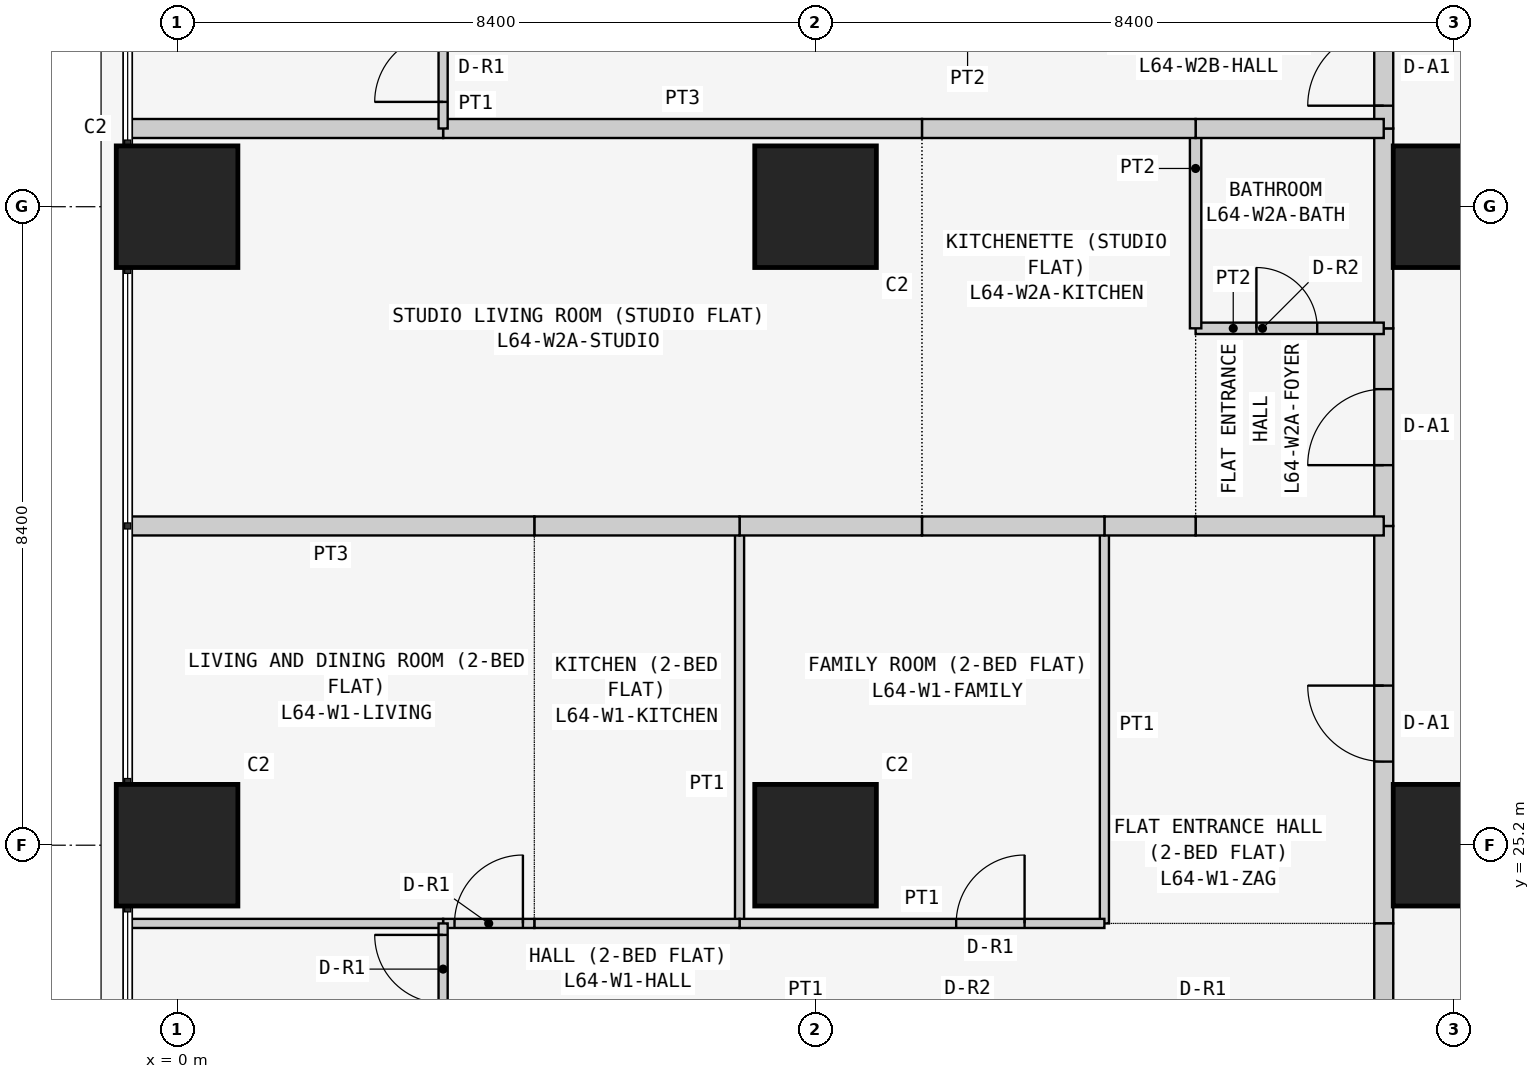
"""IFC4 building model, lengths in metres.
Left out: names, types, materials, properties, quantities, classifications, styles, units other than length and angle.
Written with IfcOpenShell. Run it as: python <this file> out.ifc"""

import sys

from ifc_helpers import new_model, si_unit, direction, frame, frame_2d, origin, origin_2d, place, context, subcontext, project, spatial, rectangle, extrude, element, fill, save


model = new_model("IFC4")
c1 = context("Model", 3, precision=1e-05, world=origin(), true_north=direction((0.0, 1.0)))
c2 = subcontext(c1, "Body", "Model", "MODEL_VIEW")
j1 = project(units=[si_unit("LENGTHUNIT", "METRE"), si_unit("PLANEANGLEUNIT", "RADIAN")], contexts=[c1])
p1 = place(None, origin())
s1 = spatial("IfcSite", under=j1, at=p1, CompositionType="ELEMENT")
p2 = place(p1, origin())
s2 = spatial("IfcBuilding", under=s1, at=p2, CompositionType="ELEMENT")
p3 = place(p2, frame((0.0, 0.0, 244.5)))
s3 = spatial("IfcBuildingStorey", under=s2, at=p3, CompositionType="ELEMENT", Elevation=244.5)
for number, where, z_axis, x_axis in (
    (1, (0.0, 25.2, 0.0), (0.0, 0.0, 1.0), (1.0, 0.0, 0.0)),
    (2, (0.0, 33.6, 0.0), (0.0, 0.0, 1.0), (1.0, 0.0, 0.0)),
    (3, (8.4, 25.2, 0.0), (0.0, 0.0, 1.0), (1.0, 0.0, 0.0)),
    (4, (8.4, 33.6, 0.0), (0.0, 0.0, 1.0), (1.0, 0.0, 0.0)),
    (5, (16.8, 25.2, 0.0), (0.0, 0.0, 1.0), (1.0, 0.0, 0.0)),
    (6, (16.8, 33.6, 0.0), (0.0, 0.0, 1.0), (1.0, 0.0, 0.0)),
):
    element("IfcColumn", number, at=place(p3, frame(where, z_axis=z_axis, x_axis=x_axis)), inside=s3, PredefinedType="COLUMN", context=c2, shape_type="SweptSolid", body=[
        extrude(rectangle(XDim=1.6, YDim=1.6, at=origin_2d()), origin(), (0.0, 0.0, 1.0), 3.6),
    ])
p4 = place(p3, frame((15.875, 24.171, 0.0), z_axis=(0.0, 0.0, 1.0), x_axis=(0.0, 1.0, 0.0)))
e7 = element("IfcWall", 7, at=p4, inside=s3, PredefinedType="PARTITIONING", context=c2, shape_type="SweptSolid", body=[
    extrude(rectangle(XDim=5.229, YDim=0.25, at=frame_2d((2.615, 0.0))), origin(), (0.0, 0.0, 1.0), 3.35),
])
p5 = place(p4, frame((2.129, 0.0, 0.0)))
e8 = element("IfcOpeningElement", 8, at=p5, cuts=e7, PredefinedType="OPENING", context=c2, shape_type="SweptSolid", body=[
    extrude(rectangle(XDim=1.0, YDim=2.1, at=frame_2d((0.5, 1.05))), frame((0.0, 0.135, 0.0), z_axis=(0.0, -1.0, 0.0), x_axis=(1.0, 0.0, 0.0)), (0.0, 0.0, 1.0), 0.27),
])
p6 = place(p3, frame((15.875, 22.971, 0.0), z_axis=(0.0, 0.0, 1.0), x_axis=(0.0, 1.0, 0.0)))
e9 = element("IfcWall", 9, at=p6, inside=s3, PredefinedType="PARTITIONING", context=c2, shape_type="SweptSolid", body=[
    extrude(rectangle(XDim=1.2, YDim=0.25, at=frame_2d((0.6, 0.0))), origin(), (0.0, 0.0, 1.0), 3.35),
])
p7 = place(p3, frame((15.875, 29.4, 0.0), z_axis=(0.0, 0.0, 1.0), x_axis=(0.0, 1.0, 0.0)))
e10 = element("IfcWall", 10, at=p7, inside=s3, PredefinedType="PARTITIONING", context=c2, shape_type="SweptSolid", body=[
    extrude(rectangle(XDim=2.6, YDim=0.25, at=frame_2d((1.3, 0.0))), origin(), (0.0, 0.0, 1.0), 3.35),
])
p8 = place(p7, frame((0.8, 0.0, 0.0)))
e11 = element("IfcOpeningElement", 11, at=p8, cuts=e10, PredefinedType="OPENING", context=c2, shape_type="SweptSolid", body=[
    extrude(rectangle(XDim=1.0, YDim=2.1, at=frame_2d((0.5, 1.05))), frame((0.0, 0.135, 0.0), z_axis=(0.0, -1.0, 0.0), x_axis=(1.0, 0.0, 0.0)), (0.0, 0.0, 1.0), 0.27),
])
p9 = place(p3, frame((15.875, 32.0, 0.0), z_axis=(0.0, 0.0, 1.0), x_axis=(0.0, 1.0, 0.0)))
e12 = element("IfcWall", 12, at=p9, inside=s3, PredefinedType="PARTITIONING", context=c2, shape_type="SweptSolid", body=[
    extrude(rectangle(XDim=2.629, YDim=0.25, at=frame_2d((1.314, 0.0))), origin(), (0.0, 0.0, 1.0), 3.35),
])
p10 = place(p3, frame((15.875, 34.629, 0.0), z_axis=(0.0, 0.0, 1.0), x_axis=(0.0, 1.0, 0.0)))
e13 = element("IfcWall", 13, at=p10, inside=s3, PredefinedType="PARTITIONING", context=c2, shape_type="SweptSolid", body=[
    extrude(rectangle(XDim=1.6, YDim=0.25, at=frame_2d((0.8, 0.0))), origin(), (0.0, 0.0, 1.0), 3.35),
])
p11 = place(p10, frame((0.3, 0.0, 0.0)))
e14 = element("IfcOpeningElement", 14, at=p11, cuts=e13, PredefinedType="OPENING", context=c2, shape_type="SweptSolid", body=[
    extrude(rectangle(XDim=1.0, YDim=2.1, at=frame_2d((0.5, 1.05))), frame((0.0, 0.135, 0.0), z_axis=(0.0, -1.0, 0.0), x_axis=(1.0, 0.0, 0.0)), (0.0, 0.0, 1.0), 0.27),
])
p12 = place(p3, frame((12.2, 29.4, 0.0), z_axis=(0.0, 0.0, 1.0), x_axis=(0.0, -1.0, 0.0)))
e15 = element("IfcWall", 15, at=p12, inside=s3, PredefinedType="PARTITIONING", context=c2, shape_type="SweptSolid", body=[
    extrude(rectangle(XDim=5.229, YDim=0.12, at=frame_2d((2.615, 0.0))), origin(), (0.0, 0.0, 1.0), 3.35),
])
p13 = place(p3, frame((15.875, 29.4, 0.0), z_axis=(0.0, 0.0, 1.0), x_axis=(-1.0, 0.0, 0.0)))
e16 = element("IfcWall", 16, at=p13, inside=s3, PredefinedType="PARTITIONING", context=c2, shape_type="SweptSolid", body=[
    extrude(rectangle(XDim=2.475, YDim=0.25, at=frame_2d((1.238, 0.0))), origin(), (0.0, 0.0, 1.0), 3.35),
])
p14 = place(p3, frame((13.4, 29.4, 0.0), z_axis=(0.0, 0.0, 1.0), x_axis=(-1.0, 0.0, 0.0)))
e17 = element("IfcWall", 17, at=p14, inside=s3, PredefinedType="PARTITIONING", context=c2, shape_type="SweptSolid", body=[
    extrude(rectangle(XDim=1.2, YDim=0.25, at=frame_2d((0.6, 0.0))), origin(), (0.0, 0.0, 1.0), 3.35),
])
p15 = place(p3, frame((7.4, 29.4, 0.0), z_axis=(0.0, 0.0, 1.0), x_axis=(0.0, -1.0, 0.0)))
e18 = element("IfcWall", 18, at=p15, inside=s3, PredefinedType="PARTITIONING", context=c2, shape_type="SweptSolid", body=[
    extrude(rectangle(XDim=5.229, YDim=0.12, at=frame_2d((2.615, 0.0))), origin(), (0.0, 0.0, 1.0), 3.35),
])
p16 = place(p3, frame((7.4, 24.171, 0.0), z_axis=(0.0, 0.0, 1.0), x_axis=(1.0, 0.0, 0.0)))
e19 = element("IfcWall", 19, at=p16, inside=s3, PredefinedType="PARTITIONING", context=c2, shape_type="SweptSolid", body=[
    extrude(rectangle(XDim=4.8, YDim=0.12, at=frame_2d((2.4, 0.0))), origin(), (0.0, 0.0, 1.0), 3.35),
])
p17 = place(p16, frame((2.85, 0.0, 0.0)))
e20 = element("IfcOpeningElement", 20, at=p17, cuts=e19, PredefinedType="OPENING", context=c2, shape_type="SweptSolid", body=[
    extrude(rectangle(XDim=0.9, YDim=2.1, at=frame_2d((0.45, 1.05))), frame((0.0, 0.07, 0.0), z_axis=(0.0, -1.0, 0.0), x_axis=(1.0, 0.0, 0.0)), (0.0, 0.0, 1.0), 0.14),
])
p18 = place(p3, frame((12.2, 29.4, 0.0), z_axis=(0.0, 0.0, 1.0), x_axis=(-1.0, 0.0, 0.0)))
e21 = element("IfcWall", 21, at=p18, inside=s3, PredefinedType="PARTITIONING", context=c2, shape_type="SweptSolid", body=[
    extrude(rectangle(XDim=2.4, YDim=0.25, at=frame_2d((1.2, 0.0))), origin(), (0.0, 0.0, 1.0), 3.35),
])
p19 = place(p3, frame((9.8, 29.4, 0.0), z_axis=(0.0, 0.0, 1.0), x_axis=(-1.0, 0.0, 0.0)))
e22 = element("IfcWall", 22, at=p19, inside=s3, PredefinedType="PARTITIONING", context=c2, shape_type="SweptSolid", body=[
    extrude(rectangle(XDim=2.4, YDim=0.25, at=frame_2d((1.2, 0.0))), origin(), (0.0, 0.0, 1.0), 3.35),
])
p20 = place(p3, frame((4.7, 24.171, 0.0), z_axis=(0.0, 0.0, 1.0), x_axis=(1.0, 0.0, 0.0)))
e23 = element("IfcWall", 23, at=p20, inside=s3, PredefinedType="PARTITIONING", context=c2, shape_type="SweptSolid", body=[
    extrude(rectangle(XDim=2.7, YDim=0.12, at=frame_2d((1.35, 0.0))), origin(), (0.0, 0.0, 1.0), 3.35),
])
p21 = place(p3, frame((7.4, 29.4, 0.0), z_axis=(0.0, 0.0, 1.0), x_axis=(-1.0, 0.0, 0.0)))
e24 = element("IfcWall", 24, at=p21, inside=s3, PredefinedType="PARTITIONING", context=c2, shape_type="SweptSolid", body=[
    extrude(rectangle(XDim=2.7, YDim=0.25, at=frame_2d((1.35, 0.0))), origin(), (0.0, 0.0, 1.0), 3.35),
])
p22 = place(p3, frame((3.5, 24.171, 0.0), z_axis=(0.0, 0.0, 1.0), x_axis=(1.0, 0.0, 0.0)))
e25 = element("IfcWall", 25, at=p22, inside=s3, PredefinedType="PARTITIONING", context=c2, shape_type="SweptSolid", body=[
    extrude(rectangle(XDim=1.2, YDim=0.12, at=frame_2d((0.6, 0.0))), origin(), (0.0, 0.0, 1.0), 3.35),
])
p23 = place(p22, frame((0.15, 0.0, 0.0)))
e26 = element("IfcOpeningElement", 26, at=p23, cuts=e25, PredefinedType="OPENING", context=c2, shape_type="SweptSolid", body=[
    extrude(rectangle(XDim=0.9, YDim=2.1, at=frame_2d((0.45, 1.05))), frame((0.0, 0.07, 0.0), z_axis=(0.0, -1.0, 0.0), x_axis=(1.0, 0.0, 0.0)), (0.0, 0.0, 1.0), 0.14),
])
p24 = place(p3, frame((-0.65, 24.171, 0.0), z_axis=(0.0, 0.0, 1.0), x_axis=(1.0, 0.0, 0.0)))
e27 = element("IfcWall", 27, at=p24, inside=s3, PredefinedType="PARTITIONING", context=c2, shape_type="SweptSolid", body=[
    extrude(rectangle(XDim=4.15, YDim=0.12, at=frame_2d((2.075, 0.0))), origin(), (0.0, 0.0, 1.0), 3.35),
])
p25 = place(p3, frame((4.7, 29.4, 0.0), z_axis=(0.0, 0.0, 1.0), x_axis=(-1.0, 0.0, 0.0)))
e28 = element("IfcWall", 28, at=p25, inside=s3, PredefinedType="PARTITIONING", context=c2, shape_type="SweptSolid", body=[
    extrude(rectangle(XDim=5.35, YDim=0.25, at=frame_2d((2.675, 0.0))), origin(), (0.0, 0.0, 1.0), 3.35),
])
p26 = place(p3, frame((3.5, 24.171, 0.0), z_axis=(0.0, 0.0, 1.0), x_axis=(0.0, -1.0, 0.0)))
e29 = element("IfcWall", 29, at=p26, inside=s3, PredefinedType="PARTITIONING", context=c2, shape_type="SweptSolid", body=[
    extrude(rectangle(XDim=1.2, YDim=0.12, at=frame_2d((0.6, 0.0))), origin(), (0.0, 0.0, 1.0), 3.35),
])
p27 = place(p26, frame((0.151, 0.0, 0.0)))
e30 = element("IfcOpeningElement", 30, at=p27, cuts=e29, PredefinedType="OPENING", context=c2, shape_type="SweptSolid", body=[
    extrude(rectangle(XDim=0.9, YDim=2.1, at=frame_2d((0.45, 1.05))), frame((0.0, 0.07, 0.0), z_axis=(0.0, -1.0, 0.0), x_axis=(1.0, 0.0, 0.0)), (0.0, 0.0, 1.0), 0.14),
])
p28 = place(p3, frame((13.4, 32.0, 0.0), z_axis=(0.0, 0.0, 1.0), x_axis=(1.0, 0.0, 0.0)))
e31 = element("IfcWall", 31, at=p28, inside=s3, PredefinedType="PARTITIONING", context=c2, shape_type="SweptSolid", body=[
    extrude(rectangle(XDim=2.475, YDim=0.15, at=frame_2d((1.238, 0.0))), origin(), (0.0, 0.0, 1.0), 3.35),
])
p29 = place(p28, frame((0.8, 0.0, 0.0)))
e32 = element("IfcOpeningElement", 32, at=p29, cuts=e31, PredefinedType="OPENING", context=c2, shape_type="SweptSolid", body=[
    extrude(rectangle(XDim=0.8, YDim=2.1, at=frame_2d((0.4, 1.05))), frame((0.0, 0.085, 0.0), z_axis=(0.0, -1.0, 0.0), x_axis=(1.0, 0.0, 0.0)), (0.0, 0.0, 1.0), 0.17),
])
p30 = place(p3, frame((13.4, 32.0, 0.0), z_axis=(0.0, 0.0, 1.0), x_axis=(0.0, 1.0, 0.0)))
e33 = element("IfcWall", 33, at=p30, inside=s3, PredefinedType="PARTITIONING", context=c2, shape_type="SweptSolid", body=[
    extrude(rectangle(XDim=2.629, YDim=0.15, at=frame_2d((1.314, 0.0))), origin(), (0.0, 0.0, 1.0), 3.35),
])
p31 = place(p3, frame((13.4, 34.629, 0.0), z_axis=(0.0, 0.0, 1.0), x_axis=(1.0, 0.0, 0.0)))
e34 = element("IfcWall", 34, at=p31, inside=s3, PredefinedType="PARTITIONING", context=c2, shape_type="SweptSolid", body=[
    extrude(rectangle(XDim=2.475, YDim=0.25, at=frame_2d((1.238, 0.0))), origin(), (0.0, 0.0, 1.0), 3.35),
])
p32 = place(p3, frame((9.8, 34.629, 0.0), z_axis=(0.0, 0.0, 1.0), x_axis=(1.0, 0.0, 0.0)))
e35 = element("IfcWall", 35, at=p32, inside=s3, PredefinedType="PARTITIONING", context=c2, shape_type="SweptSolid", body=[
    extrude(rectangle(XDim=3.6, YDim=0.25, at=frame_2d((1.8, 0.0))), origin(), (0.0, 0.0, 1.0), 3.35),
])
p33 = place(p3, frame((3.5, 34.629, 0.0), z_axis=(0.0, 0.0, 1.0), x_axis=(1.0, 0.0, 0.0)))
e36 = element("IfcWall", 36, at=p33, inside=s3, PredefinedType="PARTITIONING", context=c2, shape_type="SweptSolid", body=[
    extrude(rectangle(XDim=6.3, YDim=0.25, at=frame_2d((3.15, 0.0))), origin(), (0.0, 0.0, 1.0), 3.35),
])
p34 = place(p3, frame((-0.65, 34.629, 0.0), z_axis=(0.0, 0.0, 1.0), x_axis=(1.0, 0.0, 0.0)))
e37 = element("IfcWall", 37, at=p34, inside=s3, PredefinedType="PARTITIONING", context=c2, shape_type="SweptSolid", body=[
    extrude(rectangle(XDim=4.15, YDim=0.25, at=frame_2d((2.075, 0.0))), origin(), (0.0, 0.0, 1.0), 3.35),
])
p35 = place(p3, frame((3.5, 34.629, 0.0), z_axis=(0.0, 0.0, 1.0), x_axis=(0.0, 1.0, 0.0)))
e38 = element("IfcWall", 38, at=p35, inside=s3, PredefinedType="PARTITIONING", context=c2, shape_type="SweptSolid", body=[
    extrude(rectangle(XDim=1.6, YDim=0.12, at=frame_2d((0.8, 0.0))), origin(), (0.0, 0.0, 1.0), 3.35),
])
p36 = place(p35, frame((0.35, 0.0, 0.0)))
e39 = element("IfcOpeningElement", 39, at=p36, cuts=e38, PredefinedType="OPENING", context=c2, shape_type="SweptSolid", body=[
    extrude(rectangle(XDim=0.9, YDim=2.1, at=frame_2d((0.45, 1.05))), frame((0.0, 0.07, 0.0), z_axis=(0.0, -1.0, 0.0), x_axis=(1.0, 0.0, 0.0)), (0.0, 0.0, 1.0), 0.14),
])
p37 = place(p5, origin())
e40 = element("IfcDoor", 40, at=p37, inside=s3, OperationType="SINGLE_SWING_RIGHT", PredefinedType="DOOR", context=c2, shape_type="SweptSolid", body=[
    extrude(rectangle(XDim=1.0, YDim=2.1, at=frame_2d((0.5, 1.05))), frame((0.0, 0.025, 0.0), z_axis=(0.0, -1.0, 0.0), x_axis=(1.0, 0.0, 0.0)), (0.0, 0.0, 1.0), 0.05),
])
fill(e8, e40)
p38 = place(p17, origin())
e41 = element("IfcDoor", 41, at=p38, inside=s3, OperationType="SINGLE_SWING_RIGHT", PredefinedType="DOOR", context=c2, shape_type="SweptSolid", body=[
    extrude(rectangle(XDim=0.9, YDim=2.1, at=frame_2d((0.45, 1.05))), frame((0.0, 0.025, 0.0), z_axis=(0.0, -1.0, 0.0), x_axis=(1.0, 0.0, 0.0)), (0.0, 0.0, 1.0), 0.05),
])
fill(e20, e41)
p39 = place(p23, origin())
e42 = element("IfcDoor", 42, at=p39, inside=s3, OperationType="SINGLE_SWING_RIGHT", PredefinedType="DOOR", context=c2, shape_type="SweptSolid", body=[
    extrude(rectangle(XDim=0.9, YDim=2.1, at=frame_2d((0.45, 1.05))), frame((0.0, 0.025, 0.0), z_axis=(0.0, -1.0, 0.0), x_axis=(1.0, 0.0, 0.0)), (0.0, 0.0, 1.0), 0.05),
])
fill(e26, e42)
p40 = place(p27, frame((0.9, 0.0, 0.0), z_axis=(0.0, 0.0, 1.0), x_axis=(-1.0, 0.0, 0.0)))
e43 = element("IfcDoor", 43, at=p40, inside=s3, OperationType="SINGLE_SWING_RIGHT", PredefinedType="DOOR", context=c2, shape_type="SweptSolid", body=[
    extrude(rectangle(XDim=0.9, YDim=2.1, at=frame_2d((0.45, 1.05))), frame((0.0, 0.025, 0.0), z_axis=(0.0, -1.0, 0.0), x_axis=(1.0, 0.0, 0.0)), (0.0, 0.0, 1.0), 0.05),
])
fill(e30, e43)
p41 = place(p8, origin())
e44 = element("IfcDoor", 44, at=p41, inside=s3, OperationType="SINGLE_SWING_LEFT", PredefinedType="DOOR", context=c2, shape_type="SweptSolid", body=[
    extrude(rectangle(XDim=1.0, YDim=2.1, at=frame_2d((0.5, 1.05))), frame((0.0, 0.025, 0.0), z_axis=(0.0, -1.0, 0.0), x_axis=(1.0, 0.0, 0.0)), (0.0, 0.0, 1.0), 0.05),
])
fill(e11, e44)
p42 = place(p29, origin())
e45 = element("IfcDoor", 45, at=p42, inside=s3, OperationType="SINGLE_SWING_LEFT", PredefinedType="DOOR", context=c2, shape_type="SweptSolid", body=[
    extrude(rectangle(XDim=0.8, YDim=2.1, at=frame_2d((0.4, 1.05))), frame((0.0, 0.025, 0.0), z_axis=(0.0, -1.0, 0.0), x_axis=(1.0, 0.0, 0.0)), (0.0, 0.0, 1.0), 0.05),
])
fill(e32, e45)
p43 = place(p11, origin())
e46 = element("IfcDoor", 46, at=p43, inside=s3, OperationType="SINGLE_SWING_LEFT", PredefinedType="DOOR", context=c2, shape_type="SweptSolid", body=[
    extrude(rectangle(XDim=1.0, YDim=2.1, at=frame_2d((0.5, 1.05))), frame((0.0, 0.025, 0.0), z_axis=(0.0, -1.0, 0.0), x_axis=(1.0, 0.0, 0.0)), (0.0, 0.0, 1.0), 0.05),
])
fill(e14, e46)
p44 = place(p36, origin())
e47 = element("IfcDoor", 47, at=p44, inside=s3, OperationType="SINGLE_SWING_LEFT", PredefinedType="DOOR", context=c2, shape_type="SweptSolid", body=[
    extrude(rectangle(XDim=0.9, YDim=2.1, at=frame_2d((0.45, 1.05))), frame((0.0, 0.025, 0.0), z_axis=(0.0, -1.0, 0.0), x_axis=(1.0, 0.0, 0.0)), (0.0, 0.0, 1.0), 0.05),
])
fill(e39, e47)
save(model, sys.argv[1])
